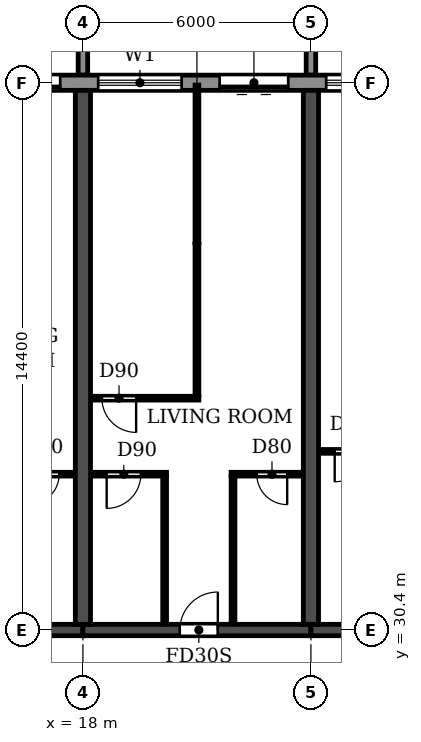
"""IFC4 building model, lengths in metres.
Left out: names, types, materials, properties, quantities, classifications, styles, units other than length and angle.
Written with IfcOpenShell. Run it as: python <this file> out.ifc"""

import sys

from ifc_helpers import new_model, si_unit, direction, frame, frame_2d, origin, place, context, subcontext, project, spatial, polyline, rectangle, outline, extrude, source, transform, mapped, element, fill, save


model = new_model("IFC4")
c1 = context("Model", 3, precision=1e-05, world=origin(), true_north=direction((0.0, 1.0)))
c2 = subcontext(c1, "Body", "Model", "MODEL_VIEW")
j1 = project(units=[si_unit("LENGTHUNIT", "METRE"), si_unit("PLANEANGLEUNIT", "RADIAN")], contexts=[c1])
p1 = place(None, origin())
s1 = spatial("IfcSite", under=j1, at=p1, CompositionType="ELEMENT")
p2 = place(p1, origin())
s2 = spatial("IfcBuilding", under=s1, at=p2, CompositionType="ELEMENT")
p3 = place(p2, frame((0.0, 0.0, 56.4)))
s3 = spatial("IfcBuildingStorey", under=s2, at=p3, CompositionType="ELEMENT", Elevation=56.4)
for number, where, z_axis, x_axis in (
    (1, (18.0, 30.55, 0.0), (0.0, 0.0, 1.0), (0.0, 1.0, 0.0)),
    (2, (24.0, 30.55, 0.0), (0.0, 0.0, 1.0), (0.0, 1.0, 0.0)),
):
    element("IfcWall", number, at=place(p3, frame(where, z_axis=z_axis, x_axis=x_axis)), inside=s3, PredefinedType="SHEAR", context=c2, shape_type="SweptSolid", body=[
        extrude(rectangle(XDim=14.05, YDim=0.4, at=frame_2d((7.025, 0.0))), origin(), (0.0, 0.0, 1.0), 3.05),
    ])
p4 = place(p3, frame((12.0, 30.4, 0.0), z_axis=(0.0, 0.0, 1.0), x_axis=(1.0, 0.0, 0.0)))
e3 = element("IfcWall", 3, at=p4, inside=s3, PredefinedType="SHEAR", context=c2, shape_type="SweptSolid", body=[
    extrude(rectangle(XDim=6.0, YDim=0.3, at=frame_2d((3.0, 0.0))), origin(), (0.0, 0.0, 1.0), 2.45),
])
p5 = place(p4, frame((2.55, 0.0, 0.0)))
e4 = element("IfcOpeningElement", 4, at=p5, cuts=e3, PredefinedType="OPENING", context=c2, shape_type="SweptSolid", body=[
    extrude(rectangle(XDim=1.0, YDim=2.1, at=frame_2d((0.5, 1.05))), frame((0.0, 0.16, 0.0), z_axis=(0.0, -1.0, 0.0), x_axis=(1.0, 0.0, 0.0)), (0.0, 0.0, 1.0), 0.32),
])
p6 = place(p3, frame((18.0, 30.4, 0.0), z_axis=(0.0, 0.0, 1.0), x_axis=(1.0, 0.0, 0.0)))
e5 = element("IfcWall", 5, at=p6, inside=s3, PredefinedType="SHEAR", context=c2, shape_type="SweptSolid", body=[
    extrude(rectangle(XDim=6.0, YDim=0.3, at=frame_2d((3.0, 0.0))), origin(), (0.0, 0.0, 1.0), 2.45),
])
p7 = place(p6, frame((2.55, 0.0, 0.0)))
e6 = element("IfcOpeningElement", 6, at=p7, cuts=e5, PredefinedType="OPENING", context=c2, shape_type="SweptSolid", body=[
    extrude(rectangle(XDim=1.0, YDim=2.1, at=frame_2d((0.5, 1.05))), frame((0.0, 0.16, 0.0), z_axis=(0.0, -1.0, 0.0), x_axis=(1.0, 0.0, 0.0)), (0.0, 0.0, 1.0), 0.32),
])
p8 = place(p3, frame((24.0, 30.4, 0.0), z_axis=(0.0, 0.0, 1.0), x_axis=(1.0, 0.0, 0.0)))
e7 = element("IfcWall", 7, at=p8, inside=s3, PredefinedType="SHEAR", context=c2, shape_type="SweptSolid", body=[
    extrude(rectangle(XDim=6.0, YDim=0.3, at=frame_2d((3.0, 0.0))), origin(), (0.0, 0.0, 1.0), 2.45),
])
p9 = place(p8, frame((2.45, 0.0, 0.0)))
e8 = element("IfcOpeningElement", 8, at=p9, cuts=e7, PredefinedType="OPENING", context=c2, shape_type="SweptSolid", body=[
    extrude(rectangle(XDim=1.0, YDim=2.1, at=frame_2d((0.5, 1.05))), frame((0.0, 0.16, 0.0), z_axis=(0.0, -1.0, 0.0), x_axis=(1.0, 0.0, 0.0)), (0.0, 0.0, 1.0), 0.32),
])
p10 = place(p3, frame((91.317, 44.8, 0.0), z_axis=(0.0, 0.0, 1.0), x_axis=(-1.0, 0.0, 0.0)))
e9 = element("IfcWall", 9, at=p10, inside=s3, PredefinedType="STANDARD", context=c2, shape_type="SweptSolid", body=[
    extrude(rectangle(XDim=80.634, YDim=0.4, at=frame_2d((40.317, 0.0))), origin(), (0.0, 0.0, 1.0), 3.05),
])
p11 = place(p10, frame((76.717, 0.0, 0.9)))
e10 = element("IfcOpeningElement", 10, at=p11, cuts=e9, PredefinedType="OPENING", context=c2, shape_type="SweptSolid", body=[
    extrude(rectangle(XDim=2.2, YDim=1.5, at=frame_2d((1.1, 0.75))), frame((0.0, 0.21, 0.0), z_axis=(0.0, -1.0, 0.0), x_axis=(1.0, 0.0, 0.0)), (0.0, 0.0, 1.0), 0.42),
])
p12 = place(p10, frame((73.917, 0.0, 0.0)))
e11 = element("IfcOpeningElement", 11, at=p12, cuts=e9, PredefinedType="OPENING", context=c2, shape_type="SweptSolid", body=[
    extrude(rectangle(XDim=1.8, YDim=2.4, at=frame_2d((0.9, 1.2))), frame((0.0, 0.21, 0.0), z_axis=(0.0, -1.0, 0.0), x_axis=(1.0, 0.0, 0.0)), (0.0, 0.0, 1.0), 0.42),
])
p13 = place(p10, frame((70.717, 0.0, 0.9)))
e12 = element("IfcOpeningElement", 12, at=p13, cuts=e9, PredefinedType="OPENING", context=c2, shape_type="SweptSolid", body=[
    extrude(rectangle(XDim=2.2, YDim=1.5, at=frame_2d((1.1, 0.75))), frame((0.0, 0.21, 0.0), z_axis=(0.0, -1.0, 0.0), x_axis=(1.0, 0.0, 0.0)), (0.0, 0.0, 1.0), 0.42),
])
p14 = place(p10, frame((67.917, 0.0, 0.0)))
e13 = element("IfcOpeningElement", 13, at=p14, cuts=e9, PredefinedType="OPENING", context=c2, shape_type="SweptSolid", body=[
    extrude(rectangle(XDim=1.8, YDim=2.4, at=frame_2d((0.9, 1.2))), frame((0.0, 0.21, 0.0), z_axis=(0.0, -1.0, 0.0), x_axis=(1.0, 0.0, 0.0)), (0.0, 0.0, 1.0), 0.42),
])
p15 = place(p10, frame((64.717, 0.0, 0.9)))
e14 = element("IfcOpeningElement", 14, at=p15, cuts=e9, PredefinedType="OPENING", context=c2, shape_type="SweptSolid", body=[
    extrude(rectangle(XDim=2.2, YDim=1.5, at=frame_2d((1.1, 0.75))), frame((0.0, 0.21, 0.0), z_axis=(0.0, -1.0, 0.0), x_axis=(1.0, 0.0, 0.0)), (0.0, 0.0, 1.0), 0.42),
])
p16 = place(p10, frame((61.917, 0.0, 0.0)))
e15 = element("IfcOpeningElement", 15, at=p16, cuts=e9, PredefinedType="OPENING", context=c2, shape_type="SweptSolid", body=[
    extrude(rectangle(XDim=1.8, YDim=2.4, at=frame_2d((0.9, 1.2))), frame((0.0, 0.21, 0.0), z_axis=(0.0, -1.0, 0.0), x_axis=(1.0, 0.0, 0.0)), (0.0, 0.0, 1.0), 0.42),
])
p17 = place(p10, frame((58.717, 0.0, 0.9)))
e16 = element("IfcOpeningElement", 16, at=p17, cuts=e9, PredefinedType="OPENING", context=c2, shape_type="SweptSolid", body=[
    extrude(rectangle(XDim=2.2, YDim=1.5, at=frame_2d((1.1, 0.75))), frame((0.0, 0.21, 0.0), z_axis=(0.0, -1.0, 0.0), x_axis=(1.0, 0.0, 0.0)), (0.0, 0.0, 1.0), 0.42),
])
p18 = place(p10, frame((55.717, 0.0, 0.9)))
e17 = element("IfcOpeningElement", 17, at=p18, cuts=e9, PredefinedType="OPENING", context=c2, shape_type="SweptSolid", body=[
    extrude(rectangle(XDim=2.2, YDim=1.5, at=frame_2d((1.1, 0.75))), frame((0.0, 0.21, 0.0), z_axis=(0.0, -1.0, 0.0), x_axis=(1.0, 0.0, 0.0)), (0.0, 0.0, 1.0), 0.42),
])
p19 = place(p10, frame((52.917, 0.0, 0.0)))
e18 = element("IfcOpeningElement", 18, at=p19, cuts=e9, PredefinedType="OPENING", context=c2, shape_type="SweptSolid", body=[
    extrude(rectangle(XDim=1.8, YDim=2.4, at=frame_2d((0.9, 1.2))), frame((0.0, 0.21, 0.0), z_axis=(0.0, -1.0, 0.0), x_axis=(1.0, 0.0, 0.0)), (0.0, 0.0, 1.0), 0.42),
])
p20 = place(p10, frame((49.717, 0.0, 0.9)))
e19 = element("IfcOpeningElement", 19, at=p20, cuts=e9, PredefinedType="OPENING", context=c2, shape_type="SweptSolid", body=[
    extrude(rectangle(XDim=2.2, YDim=1.5, at=frame_2d((1.1, 0.75))), frame((0.0, 0.21, 0.0), z_axis=(0.0, -1.0, 0.0), x_axis=(1.0, 0.0, 0.0)), (0.0, 0.0, 1.0), 0.42),
])
p21 = place(p10, frame((46.917, 0.0, 0.0)))
e20 = element("IfcOpeningElement", 20, at=p21, cuts=e9, PredefinedType="OPENING", context=c2, shape_type="SweptSolid", body=[
    extrude(rectangle(XDim=1.8, YDim=2.4, at=frame_2d((0.9, 1.2))), frame((0.0, 0.21, 0.0), z_axis=(0.0, -1.0, 0.0), x_axis=(1.0, 0.0, 0.0)), (0.0, 0.0, 1.0), 0.42),
])
p22 = place(p10, frame((43.717, 0.0, 0.9)))
e21 = element("IfcOpeningElement", 21, at=p22, cuts=e9, PredefinedType="OPENING", context=c2, shape_type="SweptSolid", body=[
    extrude(rectangle(XDim=2.2, YDim=1.5, at=frame_2d((1.1, 0.75))), frame((0.0, 0.21, 0.0), z_axis=(0.0, -1.0, 0.0), x_axis=(1.0, 0.0, 0.0)), (0.0, 0.0, 1.0), 0.42),
])
p23 = place(p10, frame((40.717, 0.0, 0.9)))
e22 = element("IfcOpeningElement", 22, at=p23, cuts=e9, PredefinedType="OPENING", context=c2, shape_type="SweptSolid", body=[
    extrude(rectangle(XDim=2.2, YDim=1.5, at=frame_2d((1.1, 0.75))), frame((0.0, 0.21, 0.0), z_axis=(0.0, -1.0, 0.0), x_axis=(1.0, 0.0, 0.0)), (0.0, 0.0, 1.0), 0.42),
])
p24 = place(p10, frame((37.717, 0.0, 0.9)))
e23 = element("IfcOpeningElement", 23, at=p24, cuts=e9, PredefinedType="OPENING", context=c2, shape_type="SweptSolid", body=[
    extrude(rectangle(XDim=2.2, YDim=1.5, at=frame_2d((1.1, 0.75))), frame((0.0, 0.21, 0.0), z_axis=(0.0, -1.0, 0.0), x_axis=(1.0, 0.0, 0.0)), (0.0, 0.0, 1.0), 0.42),
])
p25 = place(p10, frame((34.717, 0.0, 0.9)))
e24 = element("IfcOpeningElement", 24, at=p25, cuts=e9, PredefinedType="OPENING", context=c2, shape_type="SweptSolid", body=[
    extrude(rectangle(XDim=2.2, YDim=1.5, at=frame_2d((1.1, 0.75))), frame((0.0, 0.21, 0.0), z_axis=(0.0, -1.0, 0.0), x_axis=(1.0, 0.0, 0.0)), (0.0, 0.0, 1.0), 0.42),
])
p26 = place(p10, frame((31.917, 0.0, 0.0)))
e25 = element("IfcOpeningElement", 25, at=p26, cuts=e9, PredefinedType="OPENING", context=c2, shape_type="SweptSolid", body=[
    extrude(rectangle(XDim=1.8, YDim=2.4, at=frame_2d((0.9, 1.2))), frame((0.0, 0.21, 0.0), z_axis=(0.0, -1.0, 0.0), x_axis=(1.0, 0.0, 0.0)), (0.0, 0.0, 1.0), 0.42),
])
p27 = place(p10, frame((28.917, 0.0, 0.0)))
e26 = element("IfcOpeningElement", 26, at=p27, cuts=e9, PredefinedType="OPENING", context=c2, shape_type="SweptSolid", body=[
    extrude(rectangle(XDim=1.8, YDim=2.4, at=frame_2d((0.9, 1.2))), frame((0.0, 0.21, 0.0), z_axis=(0.0, -1.0, 0.0), x_axis=(1.0, 0.0, 0.0)), (0.0, 0.0, 1.0), 0.42),
])
p28 = place(p10, frame((25.717, 0.0, 0.9)))
e27 = element("IfcOpeningElement", 27, at=p28, cuts=e9, PredefinedType="OPENING", context=c2, shape_type="SweptSolid", body=[
    extrude(rectangle(XDim=2.2, YDim=1.5, at=frame_2d((1.1, 0.75))), frame((0.0, 0.21, 0.0), z_axis=(0.0, -1.0, 0.0), x_axis=(1.0, 0.0, 0.0)), (0.0, 0.0, 1.0), 0.42),
])
p29 = place(p10, frame((22.917, 0.0, 0.0)))
e28 = element("IfcOpeningElement", 28, at=p29, cuts=e9, PredefinedType="OPENING", context=c2, shape_type="SweptSolid", body=[
    extrude(rectangle(XDim=1.8, YDim=2.4, at=frame_2d((0.9, 1.2))), frame((0.0, 0.21, 0.0), z_axis=(0.0, -1.0, 0.0), x_axis=(1.0, 0.0, 0.0)), (0.0, 0.0, 1.0), 0.42),
])
p30 = place(p10, frame((19.717, 0.0, 0.9)))
e29 = element("IfcOpeningElement", 29, at=p30, cuts=e9, PredefinedType="OPENING", context=c2, shape_type="SweptSolid", body=[
    extrude(rectangle(XDim=2.2, YDim=1.5, at=frame_2d((1.1, 0.75))), frame((0.0, 0.21, 0.0), z_axis=(0.0, -1.0, 0.0), x_axis=(1.0, 0.0, 0.0)), (0.0, 0.0, 1.0), 0.42),
])
p31 = place(p10, frame((16.917, 0.0, 0.0)))
e30 = element("IfcOpeningElement", 30, at=p31, cuts=e9, PredefinedType="OPENING", context=c2, shape_type="SweptSolid", body=[
    extrude(rectangle(XDim=1.8, YDim=2.4, at=frame_2d((0.9, 1.2))), frame((0.0, 0.21, 0.0), z_axis=(0.0, -1.0, 0.0), x_axis=(1.0, 0.0, 0.0)), (0.0, 0.0, 1.0), 0.42),
])
p32 = place(p10, frame((13.717, 0.0, 0.9)))
e31 = element("IfcOpeningElement", 31, at=p32, cuts=e9, PredefinedType="OPENING", context=c2, shape_type="SweptSolid", body=[
    extrude(rectangle(XDim=2.2, YDim=1.5, at=frame_2d((1.1, 0.75))), frame((0.0, 0.21, 0.0), z_axis=(0.0, -1.0, 0.0), x_axis=(1.0, 0.0, 0.0)), (0.0, 0.0, 1.0), 0.42),
])
p33 = place(p10, frame((10.917, 0.0, 0.0)))
e32 = element("IfcOpeningElement", 32, at=p33, cuts=e9, PredefinedType="OPENING", context=c2, shape_type="SweptSolid", body=[
    extrude(rectangle(XDim=1.8, YDim=2.4, at=frame_2d((0.9, 1.2))), frame((0.0, 0.21, 0.0), z_axis=(0.0, -1.0, 0.0), x_axis=(1.0, 0.0, 0.0)), (0.0, 0.0, 1.0), 0.42),
])
p34 = place(p10, frame((7.717, 0.0, 0.9)))
e33 = element("IfcOpeningElement", 33, at=p34, cuts=e9, PredefinedType="OPENING", context=c2, shape_type="SweptSolid", body=[
    extrude(rectangle(XDim=2.2, YDim=1.5, at=frame_2d((1.1, 0.75))), frame((0.0, 0.21, 0.0), z_axis=(0.0, -1.0, 0.0), x_axis=(1.0, 0.0, 0.0)), (0.0, 0.0, 1.0), 0.42),
])
p35 = place(p10, frame((4.717, 0.0, 0.9)))
e34 = element("IfcOpeningElement", 34, at=p35, cuts=e9, PredefinedType="OPENING", context=c2, shape_type="SweptSolid", body=[
    extrude(rectangle(XDim=2.2, YDim=1.5, at=frame_2d((1.1, 0.75))), frame((0.0, 0.21, 0.0), z_axis=(0.0, -1.0, 0.0), x_axis=(1.0, 0.0, 0.0)), (0.0, 0.0, 1.0), 0.42),
])
p36 = place(p10, frame((1.717, 0.0, 0.9)))
e35 = element("IfcOpeningElement", 35, at=p36, cuts=e9, PredefinedType="OPENING", context=c2, shape_type="SweptSolid", body=[
    extrude(rectangle(XDim=2.2, YDim=1.5, at=frame_2d((1.1, 0.75))), frame((0.0, 0.21, 0.0), z_axis=(0.0, -1.0, 0.0), x_axis=(1.0, 0.0, 0.0)), (0.0, 0.0, 1.0), 0.42),
])
m1 = source(origin(), c2, "Body", "SweptSolid", [
    extrude(outline(polyline([(0.0, 0.0), (0.25, 0.0), (0.25, 3.1), (0.0, 3.1), (0.0, 0.0)])), origin(), (0.0, 0.0, 1.0), 3.1),
])
for number, where in (
    (36, (17.875, 45.0, 0.0)),
    (37, (23.875, 45.0, 0.0)),
):
    element("IfcWall", number, at=place(p3, frame(where)), inside=s3, PredefinedType="STANDARD", context=c2, shape_type="MappedRepresentation", body=[
        mapped(m1, transform((0.0, 0.0, 0.0))),
    ])
p37 = place(p3, frame((15.9, 34.5, 0.0), z_axis=(0.0, 0.0, 1.0), x_axis=(1.0, 0.0, 0.0)))
e38 = element("IfcWall", 38, at=p37, inside=s3, PredefinedType="PARTITIONING", context=c2, shape_type="SweptSolid", body=[
    extrude(rectangle(XDim=1.89, YDim=0.1, at=frame_2d((0.945, 0.0))), origin(), (0.0, 0.0, 1.0), 3.05),
])
p38 = place(p37, frame((0.675, 0.0, 0.0)))
e39 = element("IfcOpeningElement", 39, at=p38, cuts=e38, PredefinedType="OPENING", context=c2, shape_type="SweptSolid", body=[
    extrude(rectangle(XDim=0.8, YDim=2.1, at=frame_2d((0.4, 1.05))), frame((0.0, 0.06, 0.0), z_axis=(0.0, -1.0, 0.0), x_axis=(1.0, 0.0, 0.0)), (0.0, 0.0, 1.0), 0.12),
])
p39 = place(p3, frame((18.21, 34.5, 0.0), z_axis=(0.0, 0.0, 1.0), x_axis=(1.0, 0.0, 0.0)))
e40 = element("IfcWall", 40, at=p39, inside=s3, PredefinedType="PARTITIONING", context=c2, shape_type="SweptSolid", body=[
    extrude(rectangle(XDim=1.99, YDim=0.1, at=frame_2d((0.995, 0.0))), origin(), (0.0, 0.0, 1.0), 3.05),
])
p40 = place(p39, frame((0.415, 0.0, 0.0)))
e41 = element("IfcOpeningElement", 41, at=p40, cuts=e40, PredefinedType="OPENING", context=c2, shape_type="SweptSolid", body=[
    extrude(rectangle(XDim=0.9, YDim=2.1, at=frame_2d((0.45, 1.05))), frame((0.0, 0.06, 0.0), z_axis=(0.0, -1.0, 0.0), x_axis=(1.0, 0.0, 0.0)), (0.0, 0.0, 1.0), 0.12),
])
p41 = place(p3, frame((21.9, 34.5, 0.0), z_axis=(0.0, 0.0, 1.0), x_axis=(1.0, 0.0, 0.0)))
e42 = element("IfcWall", 42, at=p41, inside=s3, PredefinedType="PARTITIONING", context=c2, shape_type="SweptSolid", body=[
    extrude(rectangle(XDim=1.89, YDim=0.1, at=frame_2d((0.945, 0.0))), origin(), (0.0, 0.0, 1.0), 3.05),
])
p42 = place(p41, frame((0.675, 0.0, 0.0)))
e43 = element("IfcOpeningElement", 43, at=p42, cuts=e42, PredefinedType="OPENING", context=c2, shape_type="SweptSolid", body=[
    extrude(rectangle(XDim=0.8, YDim=2.1, at=frame_2d((0.4, 1.05))), frame((0.0, 0.06, 0.0), z_axis=(0.0, -1.0, 0.0), x_axis=(1.0, 0.0, 0.0)), (0.0, 0.0, 1.0), 0.12),
])
p43 = place(p3, frame((24.21, 35.1, 0.0), z_axis=(0.0, 0.0, 1.0), x_axis=(1.0, 0.0, 0.0)))
e44 = element("IfcWall", 44, at=p43, inside=s3, PredefinedType="PARTITIONING", context=c2, shape_type="SweptSolid", body=[
    extrude(rectangle(XDim=1.89, YDim=0.1, at=frame_2d((0.945, 0.0))), origin(), (0.0, 0.0, 1.0), 3.05),
])
p44 = place(p43, frame((0.415, 0.0, 0.0)))
e45 = element("IfcOpeningElement", 45, at=p44, cuts=e44, PredefinedType="OPENING", context=c2, shape_type="SweptSolid", body=[
    extrude(rectangle(XDim=0.8, YDim=2.1, at=frame_2d((0.4, 1.05))), frame((0.0, 0.06, 0.0), z_axis=(0.0, -1.0, 0.0), x_axis=(1.0, 0.0, 0.0)), (0.0, 0.0, 1.0), 0.12),
])
p45 = place(p3, frame((18.21, 36.5, 0.0), z_axis=(0.0, 0.0, 1.0), x_axis=(1.0, 0.0, 0.0)))
e46 = element("IfcWall", 46, at=p45, inside=s3, PredefinedType="PARTITIONING", context=c2, shape_type="SweptSolid", body=[
    extrude(rectangle(XDim=2.84, YDim=0.1, at=frame_2d((1.42, 0.0))), origin(), (0.0, 0.0, 1.0), 3.05),
])
p46 = place(p45, frame((0.29, 0.0, 0.0)))
e47 = element("IfcOpeningElement", 47, at=p46, cuts=e46, PredefinedType="OPENING", context=c2, shape_type="SweptSolid", body=[
    extrude(rectangle(XDim=0.9, YDim=2.1, at=frame_2d((0.45, 1.05))), frame((0.0, 0.06, 0.0), z_axis=(0.0, -1.0, 0.0), x_axis=(1.0, 0.0, 0.0)), (0.0, 0.0, 1.0), 0.12),
])
p47 = place(p3, frame((20.15, 30.56, 0.0), z_axis=(0.0, 0.0, 1.0), x_axis=(0.0, 1.0, 0.0)))
e48 = element("IfcWall", 48, at=p47, inside=s3, PredefinedType="PARTITIONING", context=c2, shape_type="SweptSolid", body=[
    extrude(rectangle(XDim=3.89, YDim=0.1, at=frame_2d((1.945, 0.0))), origin(), (0.0, 0.0, 1.0), 3.05),
])
p48 = place(p3, frame((21.0, 36.55, 0.0), z_axis=(0.0, 0.0, 1.0), x_axis=(0.0, 1.0, 0.0)))
e49 = element("IfcWall", 49, at=p48, inside=s3, PredefinedType="PARTITIONING", context=c2, shape_type="SweptSolid", body=[
    extrude(rectangle(XDim=8.19, YDim=0.1, at=frame_2d((4.095, 0.0))), origin(), (0.0, 0.0, 1.0), 3.05),
])
p49 = place(p3, frame((21.95, 30.56, 0.0), z_axis=(0.0, 0.0, 1.0), x_axis=(0.0, 1.0, 0.0)))
e50 = element("IfcWall", 50, at=p49, inside=s3, PredefinedType="PARTITIONING", context=c2, shape_type="SweptSolid", body=[
    extrude(rectangle(XDim=3.89, YDim=0.1, at=frame_2d((1.945, 0.0))), origin(), (0.0, 0.0, 1.0), 3.05),
])
p50 = place(p12, origin())
e51 = element("IfcDoor", 51, at=p50, inside=s3, OperationType="DOUBLE_DOOR_SLIDING", PredefinedType="DOOR", context=c2, shape_type="SweptSolid", body=[
    extrude(rectangle(XDim=1.8, YDim=2.4, at=frame_2d((0.9, 1.2))), frame((0.0, 0.025, 0.0), z_axis=(0.0, -1.0, 0.0), x_axis=(1.0, 0.0, 0.0)), (0.0, 0.0, 1.0), 0.05),
])
fill(e11, e51)
p51 = place(p13, origin())
e52 = element("IfcWindow", 52, at=p51, inside=s3, PartitioningType="DOUBLE_PANEL_HORIZONTAL", PredefinedType="WINDOW", context=c2, shape_type="SweptSolid", body=[
    extrude(rectangle(XDim=2.2, YDim=1.5, at=frame_2d((1.1, 0.75))), frame((0.0, 0.03, 0.0), z_axis=(0.0, -1.0, 0.0), x_axis=(1.0, 0.0, 0.0)), (0.0, 0.0, 1.0), 0.06),
])
fill(e12, e52)
p52 = place(p14, origin())
e53 = element("IfcDoor", 53, at=p52, inside=s3, OperationType="DOUBLE_DOOR_SLIDING", PredefinedType="DOOR", context=c2, shape_type="SweptSolid", body=[
    extrude(rectangle(XDim=1.8, YDim=2.4, at=frame_2d((0.9, 1.2))), frame((0.0, 0.025, 0.0), z_axis=(0.0, -1.0, 0.0), x_axis=(1.0, 0.0, 0.0)), (0.0, 0.0, 1.0), 0.05),
])
fill(e13, e53)
p53 = place(p15, origin())
e54 = element("IfcWindow", 54, at=p53, inside=s3, PartitioningType="DOUBLE_PANEL_HORIZONTAL", PredefinedType="WINDOW", context=c2, shape_type="SweptSolid", body=[
    extrude(rectangle(XDim=2.2, YDim=1.5, at=frame_2d((1.1, 0.75))), frame((0.0, 0.03, 0.0), z_axis=(0.0, -1.0, 0.0), x_axis=(1.0, 0.0, 0.0)), (0.0, 0.0, 1.0), 0.06),
])
fill(e14, e54)
p54 = place(p38, frame((0.8, 0.0, 0.0), z_axis=(0.0, 0.0, 1.0), x_axis=(-1.0, 0.0, 0.0)))
e55 = element("IfcDoor", 55, at=p54, inside=s3, OperationType="SINGLE_SWING_RIGHT", PredefinedType="DOOR", context=c2, shape_type="SweptSolid", body=[
    extrude(rectangle(XDim=0.8, YDim=2.1, at=frame_2d((0.4, 1.05))), frame((0.0, 0.025, 0.0), z_axis=(0.0, -1.0, 0.0), x_axis=(1.0, 0.0, 0.0)), (0.0, 0.0, 1.0), 0.05),
])
fill(e39, e55)
p55 = place(p46, frame((0.9, 0.0, 0.0), z_axis=(0.0, 0.0, 1.0), x_axis=(-1.0, 0.0, 0.0)))
e56 = element("IfcDoor", 56, at=p55, inside=s3, OperationType="SINGLE_SWING_LEFT", PredefinedType="DOOR", context=c2, shape_type="SweptSolid", body=[
    extrude(rectangle(XDim=0.9, YDim=2.1, at=frame_2d((0.45, 1.05))), frame((0.0, 0.025, 0.0), z_axis=(0.0, -1.0, 0.0), x_axis=(1.0, 0.0, 0.0)), (0.0, 0.0, 1.0), 0.05),
])
fill(e47, e56)
p56 = place(p40, frame((0.9, 0.0, 0.0), z_axis=(0.0, 0.0, 1.0), x_axis=(-1.0, 0.0, 0.0)))
e57 = element("IfcDoor", 57, at=p56, inside=s3, OperationType="SINGLE_SWING_RIGHT", PredefinedType="DOOR", context=c2, shape_type="SweptSolid", body=[
    extrude(rectangle(XDim=0.9, YDim=2.1, at=frame_2d((0.45, 1.05))), frame((0.0, 0.025, 0.0), z_axis=(0.0, -1.0, 0.0), x_axis=(1.0, 0.0, 0.0)), (0.0, 0.0, 1.0), 0.05),
])
fill(e41, e57)
p57 = place(p7, origin())
e58 = element("IfcDoor", 58, at=p57, inside=s3, OperationType="SINGLE_SWING_RIGHT", PredefinedType="DOOR", context=c2, shape_type="SweptSolid", body=[
    extrude(rectangle(XDim=1.0, YDim=2.1, at=frame_2d((0.5, 1.05))), frame((0.0, 0.025, 0.0), z_axis=(0.0, -1.0, 0.0), x_axis=(1.0, 0.0, 0.0)), (0.0, 0.0, 1.0), 0.05),
])
fill(e6, e58)
p58 = place(p42, frame((0.8, 0.0, 0.0), z_axis=(0.0, 0.0, 1.0), x_axis=(-1.0, 0.0, 0.0)))
e59 = element("IfcDoor", 59, at=p58, inside=s3, OperationType="SINGLE_SWING_LEFT", PredefinedType="DOOR", context=c2, shape_type="SweptSolid", body=[
    extrude(rectangle(XDim=0.8, YDim=2.1, at=frame_2d((0.4, 1.05))), frame((0.0, 0.025, 0.0), z_axis=(0.0, -1.0, 0.0), x_axis=(1.0, 0.0, 0.0)), (0.0, 0.0, 1.0), 0.05),
])
fill(e43, e59)
p59 = place(p44, frame((0.8, 0.0, 0.0), z_axis=(0.0, 0.0, 1.0), x_axis=(-1.0, 0.0, 0.0)))
e60 = element("IfcDoor", 60, at=p59, inside=s3, OperationType="SINGLE_SWING_RIGHT", PredefinedType="DOOR", context=c2, shape_type="SweptSolid", body=[
    extrude(rectangle(XDim=0.8, YDim=2.1, at=frame_2d((0.4, 1.05))), frame((0.0, 0.025, 0.0), z_axis=(0.0, -1.0, 0.0), x_axis=(1.0, 0.0, 0.0)), (0.0, 0.0, 1.0), 0.05),
])
fill(e45, e60)
save(model, sys.argv[1])
